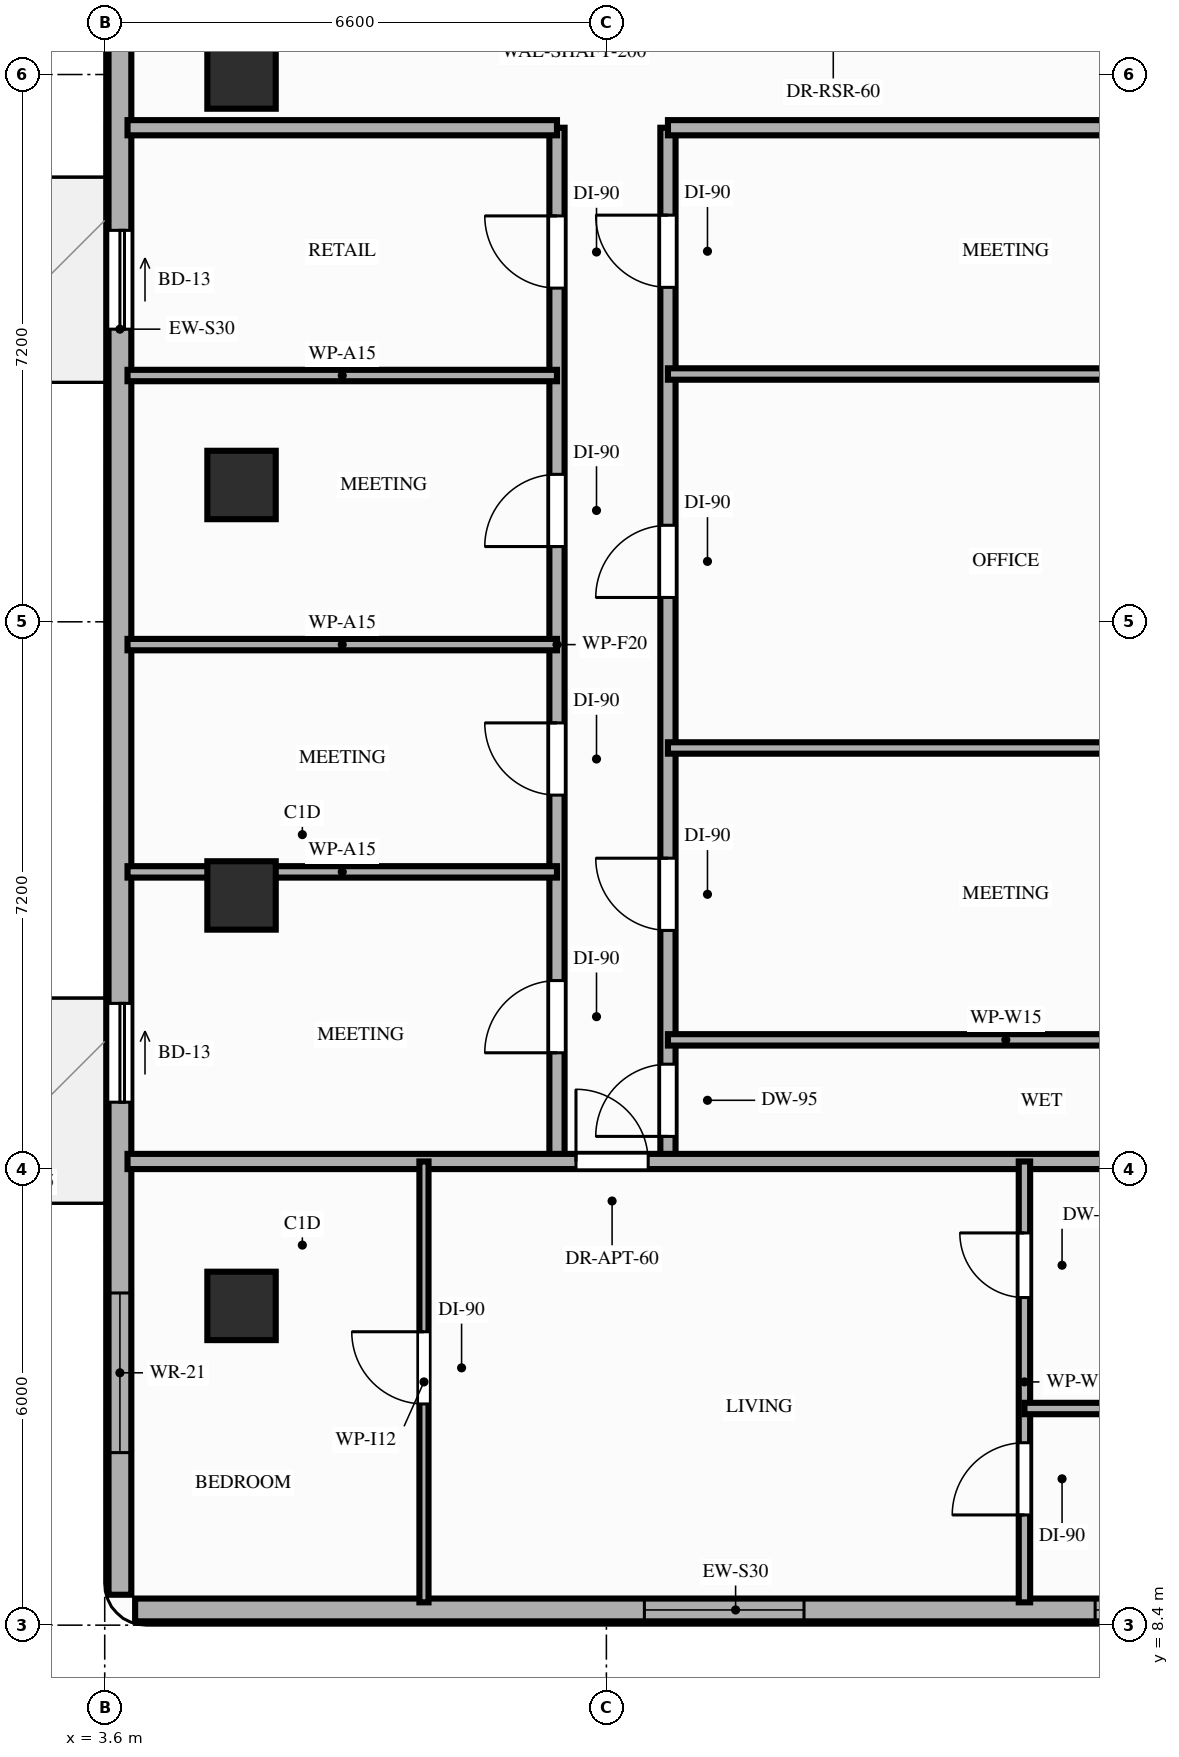
"""IFC4 building model, lengths in metres.
Left out: names, types, materials, properties, quantities, classifications, styles, units other than length and angle.
Written with IfcOpenShell. Run it as: python <this file> out.ifc"""

import sys

from ifc_helpers import new_model, si_unit, direction, frame, frame_2d, origin, origin_2d, place, context, subcontext, project, spatial, rectangle, extrude, element, fill, save


model = new_model("IFC4")
c1 = context("Model", 3, precision=1e-05, world=origin(), true_north=direction((0.0, 1.0)))
c2 = subcontext(c1, "Body", "Model", "MODEL_VIEW")
j1 = project(units=[si_unit("LENGTHUNIT", "METRE"), si_unit("PLANEANGLEUNIT", "RADIAN")], contexts=[c1])
p1 = place(None, origin())
s1 = spatial("IfcSite", under=j1, at=p1, CompositionType="ELEMENT")
p2 = place(p1, origin())
s2 = spatial("IfcBuilding", under=s1, at=p2, CompositionType="ELEMENT")
p3 = place(p2, frame((0.0, 0.0, 169.6)))
s3 = spatial("IfcBuildingStorey", under=s2, at=p3, CompositionType="ELEMENT", Elevation=169.6)
for number, where, z_axis, x_axis in (
    (1, (5.4, 12.6, 0.0), (0.0, 0.0, 1.0), (1.0, 0.0, 0.0)),
    (2, (5.4, 18.0, 0.0), (0.0, 0.0, 1.0), (1.0, 0.0, 0.0)),
    (3, (5.4, 23.4, 0.0), (0.0, 0.0, 1.0), (1.0, 0.0, 0.0)),
    (4, (5.4, 28.8, 0.0), (0.0, 0.0, 1.0), (1.0, 0.0, 0.0)),
):
    element("IfcColumn", number, at=place(p3, frame(where, z_axis=z_axis, x_axis=x_axis)), inside=s3, PredefinedType="COLUMN", context=c2, shape_type="SweptSolid", body=[
        extrude(rectangle(XDim=0.9, YDim=0.9, at=origin_2d()), origin(), (0.0, 0.0, 1.0), 3.2),
    ])
p4 = place(p3, frame((4.0, 8.6, 0.0), z_axis=(0.0, 0.0, 1.0), x_axis=(1.0, 0.0, 0.0)))
e5 = element("IfcWall", 5, at=p4, inside=s3, PredefinedType="STANDARD", context=c2, shape_type="SweptSolid", body=[
    extrude(rectangle(XDim=15.8, YDim=0.3, at=frame_2d((7.9, 0.0))), origin(), (0.0, 0.0, 1.0), 3.02),
])
p5 = place(p4, frame((6.7, 0.0, 0.85)))
e6 = element("IfcOpeningElement", 6, at=p5, cuts=e5, PredefinedType="OPENING", context=c2, shape_type="SweptSolid", body=[
    extrude(rectangle(XDim=2.1, YDim=1.8, at=frame_2d((1.05, 0.9))), frame((0.0, 0.16, 0.0), z_axis=(0.0, -1.0, 0.0), x_axis=(1.0, 0.0, 0.0)), (0.0, 0.0, 1.0), 0.32),
])
p6 = place(p4, frame((12.63, 0.0, 0.85)))
e7 = element("IfcOpeningElement", 7, at=p6, cuts=e5, PredefinedType="OPENING", context=c2, shape_type="SweptSolid", body=[
    extrude(rectangle(XDim=2.1, YDim=1.8, at=frame_2d((1.05, 0.9))), frame((0.0, 0.16, 0.0), z_axis=(0.0, -1.0, 0.0), x_axis=(1.0, 0.0, 0.0)), (0.0, 0.0, 1.0), 0.32),
])
p7 = place(p3, frame((3.8, 42.1, 0.0), z_axis=(0.0, 0.0, 1.0), x_axis=(0.0, -1.0, 0.0)))
e8 = element("IfcWall", 8, at=p7, inside=s3, PredefinedType="STANDARD", context=c2, shape_type="SweptSolid", body=[
    extrude(rectangle(XDim=33.3, YDim=0.3, at=frame_2d((16.65, 0.0))), origin(), (0.0, 0.0, 1.0), 2.71),
])
p8 = place(p7, frame((25.52, 0.0, 0.0)))
e9 = element("IfcOpeningElement", 9, at=p8, cuts=e8, PredefinedType="OPENING", context=c2, shape_type="SweptSolid", body=[
    extrude(rectangle(XDim=1.3, YDim=2.08, at=frame_2d((0.65, 1.04))), frame((0.0, 0.16, 0.0), z_axis=(0.0, -1.0, 0.0), x_axis=(1.0, 0.0, 0.0)), (0.0, 0.0, 1.0), 0.32),
])
p9 = place(p7, frame((15.35, 0.0, 0.0)))
e10 = element("IfcOpeningElement", 10, at=p9, cuts=e8, PredefinedType="OPENING", context=c2, shape_type="SweptSolid", body=[
    extrude(rectangle(XDim=1.3, YDim=2.08, at=frame_2d((0.65, 1.04))), frame((0.0, 0.16, 0.0), z_axis=(0.0, -1.0, 0.0), x_axis=(1.0, 0.0, 0.0)), (0.0, 0.0, 1.0), 0.32),
])
p10 = place(p7, frame((29.33, 0.0, 0.85)))
e11 = element("IfcOpeningElement", 11, at=p10, cuts=e8, PredefinedType="OPENING", context=c2, shape_type="SweptSolid", body=[
    extrude(rectangle(XDim=2.1, YDim=1.61, at=frame_2d((1.05, 0.805))), frame((0.0, 0.16, 0.0), z_axis=(0.0, -1.0, 0.0), x_axis=(1.0, 0.0, 0.0)), (0.0, 0.0, 1.0), 0.32),
])
p11 = place(p7, frame((9.75, 0.0, 0.85)))
e12 = element("IfcOpeningElement", 12, at=p11, cuts=e8, PredefinedType="OPENING", context=c2, shape_type="SweptSolid", body=[
    extrude(rectangle(XDim=2.1, YDim=1.61, at=frame_2d((1.05, 0.805))), frame((0.0, 0.16, 0.0), z_axis=(0.0, -1.0, 0.0), x_axis=(1.0, 0.0, 0.0)), (0.0, 0.0, 1.0), 0.32),
])
p12 = place(p7, frame((3.65, 0.0, 0.85)))
e13 = element("IfcOpeningElement", 13, at=p12, cuts=e8, PredefinedType="OPENING", context=c2, shape_type="SweptSolid", body=[
    extrude(rectangle(XDim=2.1, YDim=1.61, at=frame_2d((1.05, 0.805))), frame((0.0, 0.16, 0.0), z_axis=(0.0, -1.0, 0.0), x_axis=(1.0, 0.0, 0.0)), (0.0, 0.0, 1.0), 0.32),
])
p13 = place(p3, frame((9.55, 14.5, 0.0), z_axis=(0.0, 0.0, 1.0), x_axis=(0.0, 1.0, 0.0)))
e14 = element("IfcWall", 14, at=p13, inside=s3, PredefinedType="PARTITIONING", context=c2, shape_type="SweptSolid", body=[
    extrude(rectangle(XDim=13.6, YDim=0.2, at=frame_2d((6.8, 0.0))), origin(), (0.0, 0.0, 1.0), 2.45),
])
p14 = place(p13, frame((1.43, 0.0, 0.0)))
e15 = element("IfcOpeningElement", 15, at=p14, cuts=e14, PredefinedType="OPENING", context=c2, shape_type="SweptSolid", body=[
    extrude(rectangle(XDim=0.95, YDim=2.15, at=frame_2d((0.475, 1.075))), frame((0.0, 0.11, 0.0), z_axis=(0.0, -1.0, 0.0), x_axis=(1.0, 0.0, 0.0)), (0.0, 0.0, 1.0), 0.22),
])
p15 = place(p13, frame((4.82, 0.0, 0.0)))
e16 = element("IfcOpeningElement", 16, at=p15, cuts=e14, PredefinedType="OPENING", context=c2, shape_type="SweptSolid", body=[
    extrude(rectangle(XDim=0.95, YDim=2.15, at=frame_2d((0.475, 1.075))), frame((0.0, 0.11, 0.0), z_axis=(0.0, -1.0, 0.0), x_axis=(1.0, 0.0, 0.0)), (0.0, 0.0, 1.0), 0.22),
])
p16 = place(p13, frame((8.09, 0.0, 0.0)))
e17 = element("IfcOpeningElement", 17, at=p16, cuts=e14, PredefinedType="OPENING", context=c2, shape_type="SweptSolid", body=[
    extrude(rectangle(XDim=0.95, YDim=2.15, at=frame_2d((0.475, 1.075))), frame((0.0, 0.11, 0.0), z_axis=(0.0, -1.0, 0.0), x_axis=(1.0, 0.0, 0.0)), (0.0, 0.0, 1.0), 0.22),
])
p17 = place(p13, frame((11.49, 0.0, 0.0)))
e18 = element("IfcOpeningElement", 18, at=p17, cuts=e14, PredefinedType="OPENING", context=c2, shape_type="SweptSolid", body=[
    extrude(rectangle(XDim=0.95, YDim=2.15, at=frame_2d((0.475, 1.075))), frame((0.0, 0.11, 0.0), z_axis=(0.0, -1.0, 0.0), x_axis=(1.0, 0.0, 0.0)), (0.0, 0.0, 1.0), 0.22),
])
p18 = place(p3, frame((11.01, 14.5, 0.0), z_axis=(0.0, 0.0, 1.0), x_axis=(0.0, 1.0, 0.0)))
e19 = element("IfcWall", 19, at=p18, inside=s3, PredefinedType="PARTITIONING", context=c2, shape_type="SweptSolid", body=[
    extrude(rectangle(XDim=13.6, YDim=0.2, at=frame_2d((6.8, 0.0))), origin(), (0.0, 0.0, 1.0), 2.45),
])
p19 = place(p18, frame((0.33, 0.0, 0.0)))
e20 = element("IfcOpeningElement", 20, at=p19, cuts=e19, PredefinedType="OPENING", context=c2, shape_type="SweptSolid", body=[
    extrude(rectangle(XDim=0.95, YDim=2.1, at=frame_2d((0.475, 1.05))), frame((0.0, 0.11, 0.0), z_axis=(0.0, -1.0, 0.0), x_axis=(1.0, 0.0, 0.0)), (0.0, 0.0, 1.0), 0.22),
])
p20 = place(p18, frame((3.04, 0.0, 0.0)))
e21 = element("IfcOpeningElement", 21, at=p20, cuts=e19, PredefinedType="OPENING", context=c2, shape_type="SweptSolid", body=[
    extrude(rectangle(XDim=0.95, YDim=2.15, at=frame_2d((0.475, 1.075))), frame((0.0, 0.11, 0.0), z_axis=(0.0, -1.0, 0.0), x_axis=(1.0, 0.0, 0.0)), (0.0, 0.0, 1.0), 0.22),
])
p21 = place(p18, frame((7.42, 0.0, 0.0)))
e22 = element("IfcOpeningElement", 22, at=p21, cuts=e19, PredefinedType="OPENING", context=c2, shape_type="SweptSolid", body=[
    extrude(rectangle(XDim=0.95, YDim=2.15, at=frame_2d((0.475, 1.075))), frame((0.0, 0.11, 0.0), z_axis=(0.0, -1.0, 0.0), x_axis=(1.0, 0.0, 0.0)), (0.0, 0.0, 1.0), 0.22),
])
p22 = place(p18, frame((11.5, 0.0, 0.0)))
e23 = element("IfcOpeningElement", 23, at=p22, cuts=e19, PredefinedType="OPENING", context=c2, shape_type="SweptSolid", body=[
    extrude(rectangle(XDim=0.95, YDim=2.15, at=frame_2d((0.475, 1.075))), frame((0.0, 0.11, 0.0), z_axis=(0.0, -1.0, 0.0), x_axis=(1.0, 0.0, 0.0)), (0.0, 0.0, 1.0), 0.22),
])
p23 = place(p3, frame((3.9, 14.5, 0.0), z_axis=(0.0, 0.0, 1.0), x_axis=(1.0, 0.0, 0.0)))
e24 = element("IfcWall", 24, at=p23, inside=s3, PredefinedType="PARTITIONING", context=c2, shape_type="SweptSolid", body=[
    extrude(rectangle(XDim=16.0, YDim=0.2, at=frame_2d((8.0, 0.0))), origin(), (0.0, 0.0, 1.0), 2.45),
])
p24 = place(p23, frame((5.9, 0.0, 0.0)))
e25 = element("IfcOpeningElement", 25, at=p24, cuts=e24, PredefinedType="OPENING", context=c2, shape_type="SweptSolid", body=[
    extrude(rectangle(XDim=0.95, YDim=2.15, at=frame_2d((0.475, 1.075))), frame((0.0, 0.11, 0.0), z_axis=(0.0, -1.0, 0.0), x_axis=(1.0, 0.0, 0.0)), (0.0, 0.0, 1.0), 0.22),
])
p25 = place(p3, frame((3.9, 28.1, 0.0), z_axis=(0.0, 0.0, 1.0), x_axis=(1.0, 0.0, 0.0)))
e26 = element("IfcWall", 26, at=p25, inside=s3, PredefinedType="PARTITIONING", context=c2, shape_type="SweptSolid", body=[
    extrude(rectangle(XDim=5.65, YDim=0.2, at=frame_2d((2.825, 0.0))), origin(), (0.0, 0.0, 1.0), 2.45),
])
p26 = place(p3, frame((11.01, 28.1, 0.0), z_axis=(0.0, 0.0, 1.0), x_axis=(1.0, 0.0, 0.0)))
e27 = element("IfcWall", 27, at=p26, inside=s3, PredefinedType="PARTITIONING", context=c2, shape_type="SweptSolid", body=[
    extrude(rectangle(XDim=8.89, YDim=0.2, at=frame_2d((4.445, 0.0))), origin(), (0.0, 0.0, 1.0), 2.45),
])
p27 = place(p3, frame((7.8, 8.7, 0.0), z_axis=(0.0, 0.0, 1.0), x_axis=(0.0, 1.0, 0.0)))
e28 = element("IfcWall", 28, at=p27, inside=s3, PredefinedType="PARTITIONING", context=c2, shape_type="SweptSolid", body=[
    extrude(rectangle(XDim=5.8, YDim=0.12, at=frame_2d((2.9, 0.0))), origin(), (0.0, 0.0, 1.0), 2.45),
])
p28 = place(p27, frame((2.61, 0.0, 0.0)))
e29 = element("IfcOpeningElement", 29, at=p28, cuts=e28, PredefinedType="OPENING", context=c2, shape_type="SweptSolid", body=[
    extrude(rectangle(XDim=0.95, YDim=2.15, at=frame_2d((0.475, 1.075))), frame((0.0, 0.07, 0.0), z_axis=(0.0, -1.0, 0.0), x_axis=(1.0, 0.0, 0.0)), (0.0, 0.0, 1.0), 0.14),
])
p29 = place(p3, frame((15.7, 8.7, 0.0), z_axis=(0.0, 0.0, 1.0), x_axis=(0.0, 1.0, 0.0)))
e30 = element("IfcWall", 30, at=p29, inside=s3, PredefinedType="PARTITIONING", context=c2, shape_type="SweptSolid", body=[
    extrude(rectangle(XDim=5.8, YDim=0.15, at=frame_2d((2.9, 0.0))), origin(), (0.0, 0.0, 1.0), 2.45),
])
p30 = place(p29, frame((1.15, 0.0, 0.0)))
e31 = element("IfcOpeningElement", 31, at=p30, cuts=e30, PredefinedType="OPENING", context=c2, shape_type="SweptSolid", body=[
    extrude(rectangle(XDim=0.95, YDim=2.15, at=frame_2d((0.475, 1.075))), frame((0.0, 0.085, 0.0), z_axis=(0.0, -1.0, 0.0), x_axis=(1.0, 0.0, 0.0)), (0.0, 0.0, 1.0), 0.17),
])
p31 = place(p29, frame((4.01, 0.0, 0.0)))
e32 = element("IfcOpeningElement", 32, at=p31, cuts=e30, PredefinedType="OPENING", context=c2, shape_type="SweptSolid", body=[
    extrude(rectangle(XDim=0.85, YDim=2.1, at=frame_2d((0.425, 1.05))), frame((0.0, 0.085, 0.0), z_axis=(0.0, -1.0, 0.0), x_axis=(1.0, 0.0, 0.0)), (0.0, 0.0, 1.0), 0.17),
])
p32 = place(p3, frame((15.7, 11.25, 0.0), z_axis=(0.0, 0.0, 1.0), x_axis=(1.0, 0.0, 0.0)))
e33 = element("IfcWall", 33, at=p32, inside=s3, PredefinedType="PARTITIONING", context=c2, shape_type="SweptSolid", body=[
    extrude(rectangle(XDim=4.2, YDim=0.15, at=frame_2d((2.1, 0.0))), origin(), (0.0, 0.0, 1.0), 3.02),
])
for number, where, z_axis, x_axis in (
    (34, (3.9, 18.31, 0.0), (0.0, 0.0, 1.0), (1.0, 0.0, 0.0)),
    (35, (3.9, 21.3, 0.0), (0.0, 0.0, 1.0), (1.0, 0.0, 0.0)),
    (36, (3.9, 24.84, 0.0), (0.0, 0.0, 1.0), (1.0, 0.0, 0.0)),
):
    element("IfcWall", number, at=place(p3, frame(where, z_axis=z_axis, x_axis=x_axis)), inside=s3, PredefinedType="PARTITIONING", context=c2, shape_type="SweptSolid", body=[
        extrude(rectangle(XDim=5.65, YDim=0.15, at=frame_2d((2.825, 0.0))), origin(), (0.0, 0.0, 1.0), 2.45),
    ])
for number, where, z_axis, x_axis in (
    (37, (11.01, 16.1, 0.0), (0.0, 0.0, 1.0), (1.0, 0.0, 0.0)),
    (38, (11.01, 19.94, 0.0), (0.0, 0.0, 1.0), (1.0, 0.0, 0.0)),
    (39, (11.01, 24.86, 0.0), (0.0, 0.0, 1.0), (1.0, 0.0, 0.0)),
):
    element("IfcWall", number, at=place(p3, frame(where, z_axis=z_axis, x_axis=x_axis)), inside=s3, PredefinedType="PARTITIONING", context=c2, shape_type="SweptSolid", body=[
        extrude(rectangle(XDim=8.89, YDim=0.15, at=frame_2d((4.445, 0.0))), origin(), (0.0, 0.0, 1.0), 2.45),
    ])
p33 = place(p8, origin())
e40 = element("IfcDoor", 40, at=p33, inside=s3, OperationType="SLIDING_TO_LEFT", PredefinedType="DOOR", context=c2, shape_type="SweptSolid", body=[
    extrude(rectangle(XDim=1.3, YDim=2.08, at=frame_2d((0.65, 1.04))), frame((0.0, 0.025, 0.0), z_axis=(0.0, -1.0, 0.0), x_axis=(1.0, 0.0, 0.0)), (0.0, 0.0, 1.0), 0.05),
])
fill(e9, e40)
p34 = place(p9, origin())
e41 = element("IfcDoor", 41, at=p34, inside=s3, OperationType="SLIDING_TO_LEFT", PredefinedType="DOOR", context=c2, shape_type="SweptSolid", body=[
    extrude(rectangle(XDim=1.3, YDim=2.08, at=frame_2d((0.65, 1.04))), frame((0.0, 0.025, 0.0), z_axis=(0.0, -1.0, 0.0), x_axis=(1.0, 0.0, 0.0)), (0.0, 0.0, 1.0), 0.05),
])
fill(e10, e41)
p35 = place(p10, origin())
e42 = element("IfcWindow", 42, at=p35, inside=s3, PartitioningType="SINGLE_PANEL", PredefinedType="WINDOW", context=c2, shape_type="SweptSolid", body=[
    extrude(rectangle(XDim=2.1, YDim=1.61, at=frame_2d((1.05, 0.805))), frame((0.0, 0.03, 0.0), z_axis=(0.0, -1.0, 0.0), x_axis=(1.0, 0.0, 0.0)), (0.0, 0.0, 1.0), 0.06),
])
fill(e11, e42)
p36 = place(p5, origin())
e43 = element("IfcWindow", 43, at=p36, inside=s3, PartitioningType="SINGLE_PANEL", PredefinedType="WINDOW", context=c2, shape_type="SweptSolid", body=[
    extrude(rectangle(XDim=2.1, YDim=1.8, at=frame_2d((1.05, 0.9))), frame((0.0, 0.03, 0.0), z_axis=(0.0, -1.0, 0.0), x_axis=(1.0, 0.0, 0.0)), (0.0, 0.0, 1.0), 0.06),
])
fill(e6, e43)
p37 = place(p6, origin())
e44 = element("IfcWindow", 44, at=p37, inside=s3, PartitioningType="SINGLE_PANEL", PredefinedType="WINDOW", context=c2, shape_type="SweptSolid", body=[
    extrude(rectangle(XDim=2.1, YDim=1.8, at=frame_2d((1.05, 0.9))), frame((0.0, 0.03, 0.0), z_axis=(0.0, -1.0, 0.0), x_axis=(1.0, 0.0, 0.0)), (0.0, 0.0, 1.0), 0.06),
])
fill(e7, e44)
p38 = place(p24, origin())
e45 = element("IfcDoor", 45, at=p38, inside=s3, OperationType="SINGLE_SWING_LEFT", PredefinedType="DOOR", context=c2, shape_type="SweptSolid", body=[
    extrude(rectangle(XDim=0.95, YDim=2.15, at=frame_2d((0.475, 1.075))), frame((0.0, 0.025, 0.0), z_axis=(0.0, -1.0, 0.0), x_axis=(1.0, 0.0, 0.0)), (0.0, 0.0, 1.0), 0.05),
])
fill(e25, e45)
p39 = place(p28, origin())
e46 = element("IfcDoor", 46, at=p39, inside=s3, OperationType="SINGLE_SWING_RIGHT", PredefinedType="DOOR", context=c2, shape_type="SweptSolid", body=[
    extrude(rectangle(XDim=0.95, YDim=2.15, at=frame_2d((0.475, 1.075))), frame((0.0, 0.025, 0.0), z_axis=(0.0, -1.0, 0.0), x_axis=(1.0, 0.0, 0.0)), (0.0, 0.0, 1.0), 0.05),
])
fill(e29, e46)
p40 = place(p30, origin())
e47 = element("IfcDoor", 47, at=p40, inside=s3, OperationType="SINGLE_SWING_LEFT", PredefinedType="DOOR", context=c2, shape_type="SweptSolid", body=[
    extrude(rectangle(XDim=0.95, YDim=2.15, at=frame_2d((0.475, 1.075))), frame((0.0, 0.025, 0.0), z_axis=(0.0, -1.0, 0.0), x_axis=(1.0, 0.0, 0.0)), (0.0, 0.0, 1.0), 0.05),
])
fill(e31, e47)
p41 = place(p31, origin())
e48 = element("IfcDoor", 48, at=p41, inside=s3, OperationType="SINGLE_SWING_RIGHT", PredefinedType="DOOR", context=c2, shape_type="SweptSolid", body=[
    extrude(rectangle(XDim=0.85, YDim=2.1, at=frame_2d((0.425, 1.05))), frame((0.0, 0.025, 0.0), z_axis=(0.0, -1.0, 0.0), x_axis=(1.0, 0.0, 0.0)), (0.0, 0.0, 1.0), 0.05),
])
fill(e32, e48)
p42 = place(p14, origin())
e49 = element("IfcDoor", 49, at=p42, inside=s3, OperationType="SINGLE_SWING_LEFT", PredefinedType="DOOR", context=c2, shape_type="SweptSolid", body=[
    extrude(rectangle(XDim=0.95, YDim=2.15, at=frame_2d((0.475, 1.075))), frame((0.0, 0.025, 0.0), z_axis=(0.0, -1.0, 0.0), x_axis=(1.0, 0.0, 0.0)), (0.0, 0.0, 1.0), 0.05),
])
fill(e15, e49)
p43 = place(p15, origin())
e50 = element("IfcDoor", 50, at=p43, inside=s3, OperationType="SINGLE_SWING_RIGHT", PredefinedType="DOOR", context=c2, shape_type="SweptSolid", body=[
    extrude(rectangle(XDim=0.95, YDim=2.15, at=frame_2d((0.475, 1.075))), frame((0.0, 0.025, 0.0), z_axis=(0.0, -1.0, 0.0), x_axis=(1.0, 0.0, 0.0)), (0.0, 0.0, 1.0), 0.05),
])
fill(e16, e50)
p44 = place(p16, origin())
e51 = element("IfcDoor", 51, at=p44, inside=s3, OperationType="SINGLE_SWING_LEFT", PredefinedType="DOOR", context=c2, shape_type="SweptSolid", body=[
    extrude(rectangle(XDim=0.95, YDim=2.15, at=frame_2d((0.475, 1.075))), frame((0.0, 0.025, 0.0), z_axis=(0.0, -1.0, 0.0), x_axis=(1.0, 0.0, 0.0)), (0.0, 0.0, 1.0), 0.05),
])
fill(e17, e51)
p45 = place(p17, origin())
e52 = element("IfcDoor", 52, at=p45, inside=s3, OperationType="SINGLE_SWING_RIGHT", PredefinedType="DOOR", context=c2, shape_type="SweptSolid", body=[
    extrude(rectangle(XDim=0.95, YDim=2.15, at=frame_2d((0.475, 1.075))), frame((0.0, 0.025, 0.0), z_axis=(0.0, -1.0, 0.0), x_axis=(1.0, 0.0, 0.0)), (0.0, 0.0, 1.0), 0.05),
])
fill(e18, e52)
p46 = place(p19, origin())
e53 = element("IfcDoor", 53, at=p46, inside=s3, OperationType="SINGLE_SWING_LEFT", PredefinedType="DOOR", context=c2, shape_type="SweptSolid", body=[
    extrude(rectangle(XDim=0.95, YDim=2.1, at=frame_2d((0.475, 1.05))), frame((0.0, 0.025, 0.0), z_axis=(0.0, -1.0, 0.0), x_axis=(1.0, 0.0, 0.0)), (0.0, 0.0, 1.0), 0.05),
])
fill(e20, e53)
p47 = place(p20, origin())
e54 = element("IfcDoor", 54, at=p47, inside=s3, OperationType="SINGLE_SWING_RIGHT", PredefinedType="DOOR", context=c2, shape_type="SweptSolid", body=[
    extrude(rectangle(XDim=0.95, YDim=2.15, at=frame_2d((0.475, 1.075))), frame((0.0, 0.025, 0.0), z_axis=(0.0, -1.0, 0.0), x_axis=(1.0, 0.0, 0.0)), (0.0, 0.0, 1.0), 0.05),
])
fill(e21, e54)
p48 = place(p21, origin())
e55 = element("IfcDoor", 55, at=p48, inside=s3, OperationType="SINGLE_SWING_LEFT", PredefinedType="DOOR", context=c2, shape_type="SweptSolid", body=[
    extrude(rectangle(XDim=0.95, YDim=2.15, at=frame_2d((0.475, 1.075))), frame((0.0, 0.025, 0.0), z_axis=(0.0, -1.0, 0.0), x_axis=(1.0, 0.0, 0.0)), (0.0, 0.0, 1.0), 0.05),
])
fill(e22, e55)
p49 = place(p22, origin())
e56 = element("IfcDoor", 56, at=p49, inside=s3, OperationType="SINGLE_SWING_RIGHT", PredefinedType="DOOR", context=c2, shape_type="SweptSolid", body=[
    extrude(rectangle(XDim=0.95, YDim=2.15, at=frame_2d((0.475, 1.075))), frame((0.0, 0.025, 0.0), z_axis=(0.0, -1.0, 0.0), x_axis=(1.0, 0.0, 0.0)), (0.0, 0.0, 1.0), 0.05),
])
fill(e23, e56)
save(model, sys.argv[1])
